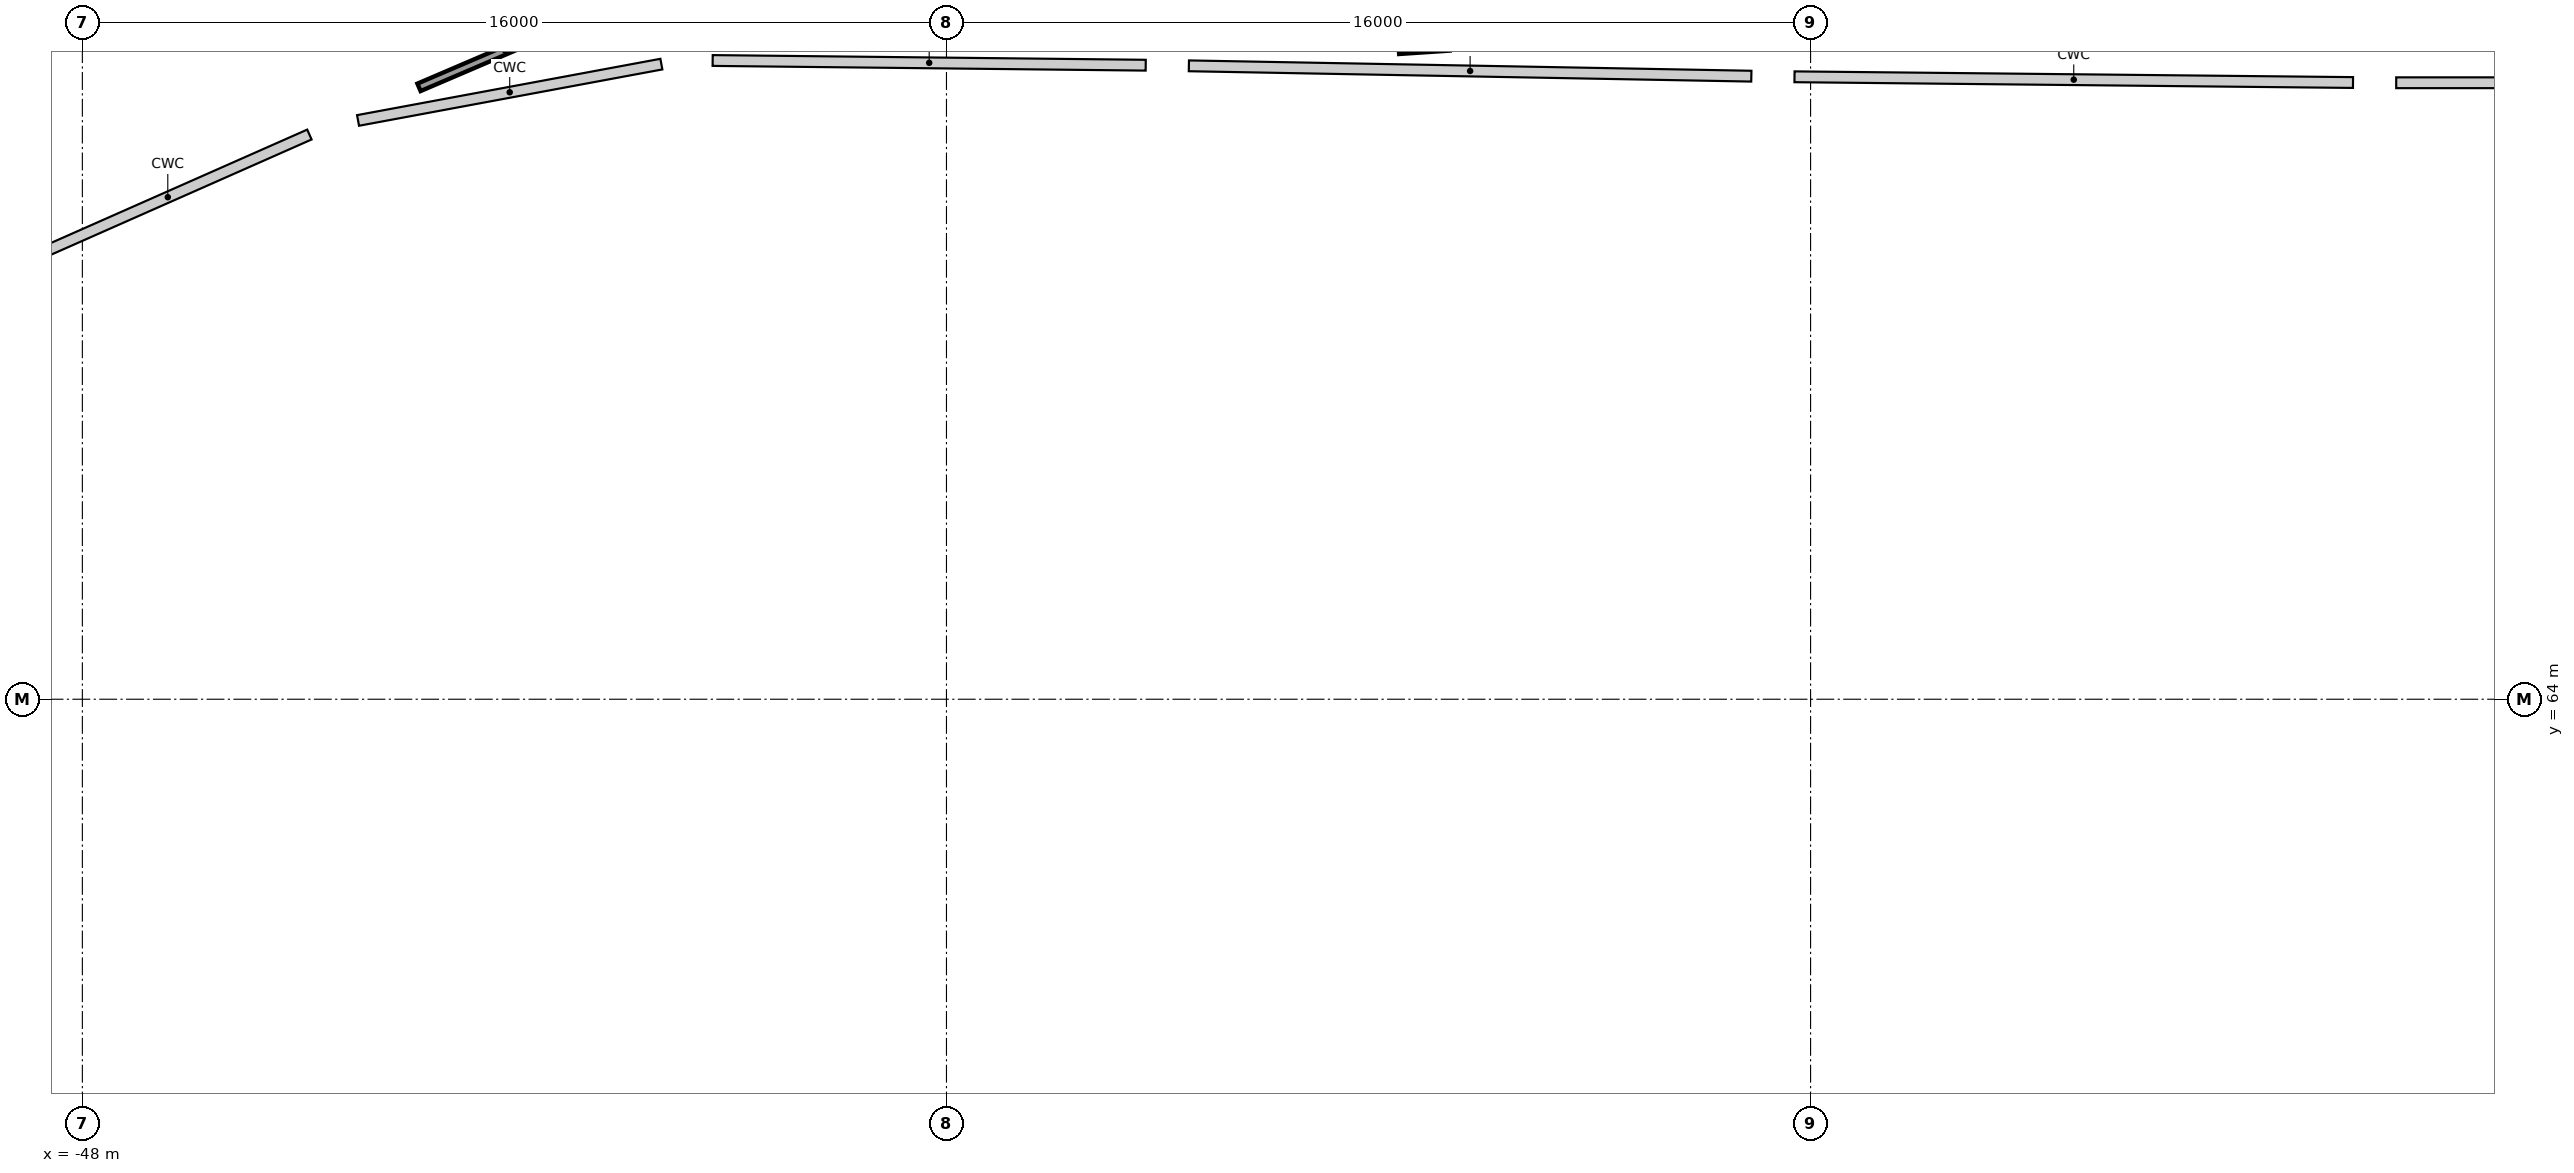
"""IFC4 building model, lengths in metres.
Left out: names, types, materials, properties, quantities, classifications, styles, units other than length and angle.
Written with IfcOpenShell. Run it as: python <this file> out.ifc"""

import sys

from ifc_helpers import new_model, si_unit, direction, frame, frame_2d, origin, origin_2d, place, context, subcontext, project, spatial, rectangle, circle, extrude, element, save


model = new_model("IFC4")
c1 = context("Model", 3, precision=1e-05, world=origin(), true_north=direction((0.0, 1.0)))
c2 = subcontext(c1, "Body", "Model", "MODEL_VIEW")
j1 = project(units=[si_unit("LENGTHUNIT", "METRE"), si_unit("PLANEANGLEUNIT", "RADIAN")], contexts=[c1])
p1 = place(None, origin())
s1 = spatial("IfcSite", under=j1, at=p1, CompositionType="ELEMENT")
p2 = place(p1, origin())
s2 = spatial("IfcBuilding", under=s1, at=p2, CompositionType="ELEMENT")
p3 = place(p2, frame((0.0, 0.0, 6.5)))
s3 = spatial("IfcBuildingStorey", under=s2, at=p3, CompositionType="ELEMENT", Elevation=6.5)
p4 = place(p3, frame((-5.192, 70.824, 0.0), z_axis=(0.0, 0.0, 1.0), x_axis=(1.0, 0.0, 0.0)))
e1 = element("IfcColumn", 1, at=p4, inside=s3, PredefinedType="COLUMN", context=c2, shape_type="SweptSolid", body=[
    extrude(circle(Radius=0.45, at=origin_2d()), origin(), (0.0, 0.0, 1.0), 5.058),
])
p5 = place(p3, frame((-5.557, 75.415, 0.0), z_axis=(0.0, 0.0, 1.0), x_axis=(1.0, 0.0, 0.0)))
e2 = element("IfcColumn", 2, at=p5, inside=s3, PredefinedType="COLUMN", context=c2, shape_type="SweptSolid", body=[
    extrude(circle(Radius=0.4, at=origin_2d()), origin(), (0.0, 0.0, 1.0), 5.5),
])
p6 = place(p3, frame((-15.621, 71.009, 0.0), z_axis=(0.0, 0.0, 1.0), x_axis=(1.0, 0.0, 0.0)))
e3 = element("IfcColumn", 3, at=p6, inside=s3, PredefinedType="COLUMN", context=c2, shape_type="SweptSolid", body=[
    extrude(circle(Radius=0.45, at=origin_2d()), origin(), (0.0, 0.0, 1.0), 5.626),
])
p7 = place(p3, frame((-16.698, 75.53, 0.0), z_axis=(0.0, 0.0, 1.0), x_axis=(1.0, 0.0, 0.0)))
e4 = element("IfcColumn", 4, at=p7, inside=s3, PredefinedType="COLUMN", context=c2, shape_type="SweptSolid", body=[
    extrude(circle(Radius=0.4, at=origin_2d()), origin(), (0.0, 0.0, 1.0), 5.5),
])
p8 = place(p3, frame((-26.038, 71.014, 0.0), z_axis=(0.0, 0.0, 1.0), x_axis=(1.0, 0.0, 0.0)))
e5 = element("IfcColumn", 5, at=p8, inside=s3, PredefinedType="COLUMN", context=c2, shape_type="SweptSolid", body=[
    extrude(circle(Radius=0.45, at=origin_2d()), origin(), (0.0, 0.0, 1.0), 5.936),
])
p9 = place(p3, frame((-27.911, 75.736, 0.0), z_axis=(0.0, 0.0, 1.0), x_axis=(1.0, 0.0, 0.0)))
e6 = element("IfcColumn", 6, at=p9, inside=s3, PredefinedType="COLUMN", context=c2, shape_type="SweptSolid", body=[
    extrude(circle(Radius=0.4, at=origin_2d()), origin(), (0.0, 0.0, 1.0), 5.5),
])
p10 = place(p3, frame((-34.761, 72.156, 0.0), z_axis=(0.0, 0.0, 1.0), x_axis=(1.0, 0.0, 0.0)))
e7 = element("IfcColumn", 7, at=p10, inside=s3, PredefinedType="COLUMN", context=c2, shape_type="SweptSolid", body=[
    extrude(circle(Radius=0.45, at=origin_2d()), origin(), (0.0, 0.0, 1.0), 5.5),
])
p11 = place(p3, frame((-36.886, 75.833, 0.0), z_axis=(0.0, 0.0, 1.0), x_axis=(1.0, 0.0, 0.0)))
e8 = element("IfcColumn", 8, at=p11, inside=s3, PredefinedType="COLUMN", context=c2, shape_type="SweptSolid", body=[
    extrude(circle(Radius=0.4, at=origin_2d()), origin(), (0.0, 0.0, 1.0), 5.5),
])
p12 = place(p3, frame((-40.308, 70.748, 0.0), z_axis=(0.0, 0.0, 1.0), x_axis=(1.0, 0.0, 0.0)))
e9 = element("IfcColumn", 9, at=p12, inside=s3, PredefinedType="COLUMN", context=c2, shape_type="SweptSolid", body=[
    extrude(circle(Radius=0.45, at=origin_2d()), origin(), (0.0, 0.0, 1.0), 5.868),
])
p13 = place(p3, frame((-43.43, 74.617, 0.0), z_axis=(0.0, 0.0, 1.0), x_axis=(1.0, 0.0, 0.0)))
e10 = element("IfcColumn", 10, at=p13, inside=s3, PredefinedType="COLUMN", context=c2, shape_type="SweptSolid", body=[
    extrude(circle(Radius=0.4, at=origin_2d()), origin(), (0.0, 0.0, 1.0), 5.5),
])
p14 = place(p3, frame((-44.39, 75.806, 0.0), z_axis=(0.0, 0.0, 1.0), x_axis=(1.0, 0.0, 0.0)))
e11 = element("IfcColumn", 11, at=p14, inside=s3, PredefinedType="COLUMN", context=c2, shape_type="SweptSolid", body=[
    extrude(circle(Radius=0.35, at=origin_2d()), origin(), (0.0, 0.0, 1.0), 5.5),
])
p15 = place(p3, frame((-45.777, 68.5, 0.0), z_axis=(0.0, 0.0, 1.0), x_axis=(1.0, 0.0, 0.0)))
e12 = element("IfcColumn", 12, at=p15, inside=s3, PredefinedType="COLUMN", context=c2, shape_type="SweptSolid", body=[
    extrude(circle(Radius=0.45, at=origin_2d()), origin(), (0.0, 0.0, 1.0), 5.72),
])
p16 = place(p3, frame((-17.447, 76.434, 0.0), z_axis=(0.0, 0.0, 1.0), x_axis=(-0.997781666394, -0.066571361774, 0.0)))
e13 = element("IfcWall", 13, at=p16, inside=s3, PredefinedType="PARTITIONING", context=c2, shape_type="SweptSolid", body=[
    extrude(rectangle(XDim=6.19, YDim=0.15, at=frame_2d((3.095, 0.0))), origin(), (0.0, 0.0, 1.0), 5.15),
])
p17 = place(p3, frame((-38.578, 76.695, 0.0), z_axis=(0.0, 0.0, 1.0), x_axis=(-0.919265141215, -0.393638921026, 0.0)))
e14 = element("IfcWall", 14, at=p17, inside=s3, PredefinedType="PARTITIONING", context=c2, shape_type="SweptSolid", body=[
    extrude(rectangle(XDim=3.468, YDim=0.15, at=frame_2d((1.734, 0.0))), origin(), (0.0, 0.0, 1.0), 5.15),
])
save(model, sys.argv[1])
